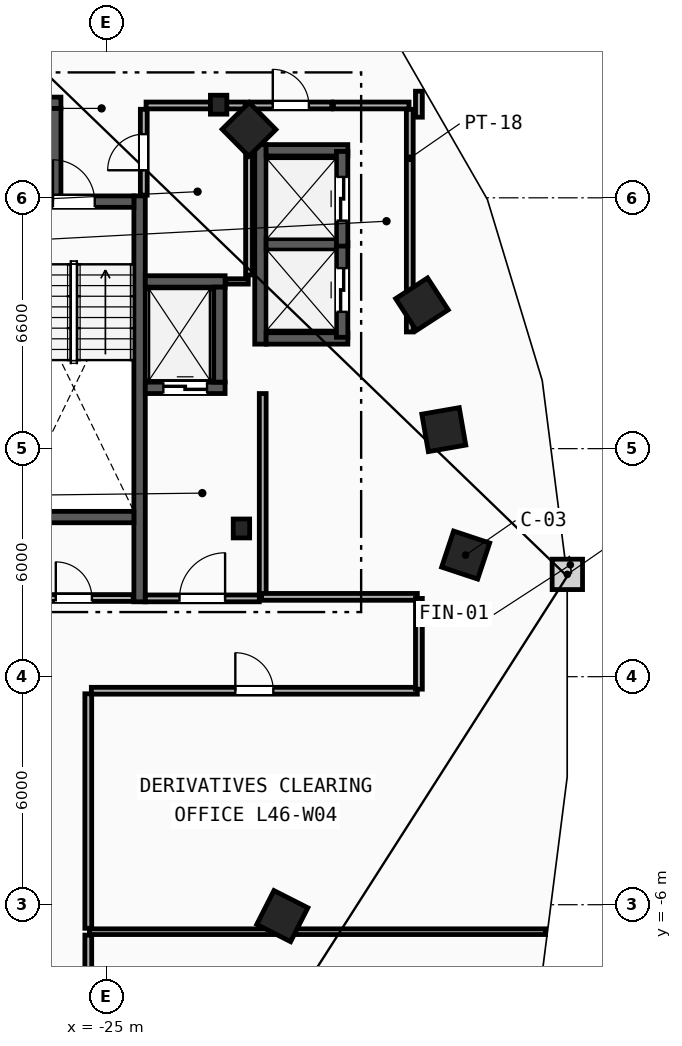
"""IFC4 building model, lengths in metres.
Left out: names, types, materials, properties, quantities, classifications, styles, units other than length and angle.
Written with IfcOpenShell. Run it as: python <this file> out.ifc"""

import sys

from ifc_helpers import new_model, si_unit, direction, frame, frame_2d, origin, origin_2d, place, context, subcontext, project, spatial, rectangle, i_section, extrude, element, fill, save


model = new_model("IFC4")
c1 = context("Model", 3, precision=1e-05, world=origin(), true_north=direction((0.0, 1.0)))
c2 = subcontext(c1, "Body", "Model", "MODEL_VIEW")
j1 = project(units=[si_unit("LENGTHUNIT", "METRE"), si_unit("PLANEANGLEUNIT", "RADIAN")], contexts=[c1])
p1 = place(None, origin())
s1 = spatial("IfcSite", under=j1, at=p1, CompositionType="ELEMENT")
p2 = place(p1, origin())
s2 = spatial("IfcBuilding", under=s1, at=p2, CompositionType="ELEMENT")
p3 = place(p2, frame((0.0, 0.0, 176.4)))
s3 = spatial("IfcBuildingStorey", under=s2, at=p3, CompositionType="ELEMENT", Elevation=176.4)
for number, where, z_axis, x_axis in (
    (1, (-21.45, 3.9, 0.0), (0.0, 0.0, 1.0), (1.0, 0.0, 0.0)),
    (2, (-22.05, 15.05, 0.0), (0.0, 0.0, 1.0), (1.0, 0.0, 0.0)),
):
    element("IfcColumn", number, at=place(p3, frame(where, z_axis=z_axis, x_axis=x_axis)), inside=s3, PredefinedType="COLUMN", context=c2, shape_type="SweptSolid", body=[
        extrude(i_section(OverallWidth=0.432, OverallDepth=0.498, WebThickness=0.056, FlangeThickness=0.089, FilletRadius=0.018, at=origin_2d()), origin(), (0.0, 0.0, 1.0), 3.6),
    ])
for number, where, z_axis, x_axis in (
    (3, (-15.55, 3.2, 0.0), (0.0, 0.0, 1.0), (0.315, 0.949, 0.0)),
    (4, (-16.125, 6.5, 0.0), (0.0, 0.0, 1.0), (-0.172, 0.985, 0.0)),
    (5, (-16.7, 9.8, 0.0), (0.0, 0.0, 1.0), (-0.544, 0.839, 0.0)),
    (6, (-21.25, 14.4, 0.0), (0.0, 0.0, 1.0), (-0.703, 0.711, 0.0)),
    (7, (-20.375, -6.3, 0.0), (0.0, 0.0, 1.0), (0.453, 0.892, 0.0)),
):
    element("IfcColumn", number, at=place(p3, frame(where, z_axis=z_axis, x_axis=x_axis)), inside=s3, PredefinedType="COLUMN", context=c2, shape_type="SweptSolid", body=[
        extrude(rectangle(XDim=1.0, YDim=1.0, at=origin_2d()), origin(), (0.0, 0.0, 1.0), 3.6),
    ])
p4 = place(p3, frame((-24.13, 1.97, 0.0), z_axis=(0.0, 0.0, 1.0), x_axis=(0.0, 1.0, 0.0)))
e8 = element("IfcWall", 8, at=p4, inside=s3, PredefinedType="SHEAR", context=c2, shape_type="SweptSolid", body=[
    extrude(rectangle(XDim=10.68, YDim=0.3, at=frame_2d((5.34, 0.0))), origin(), (0.0, 0.0, 1.0), 3.36),
])
p5 = place(p3, frame((-27.44, 12.5, 0.0), z_axis=(0.0, 0.0, 1.0), x_axis=(1.0, 0.0, 0.0)))
e9 = element("IfcWall", 9, at=p5, inside=s3, PredefinedType="SHEAR", context=c2, shape_type="SweptSolid", body=[
    extrude(rectangle(XDim=3.16, YDim=0.3, at=frame_2d((1.58, 0.0))), origin(), (0.0, 0.0, 1.0), 3.36),
])
p6 = place(p5, frame((1.03, 0.0, 0.0)))
e10 = element("IfcOpeningElement", 10, at=p6, cuts=e9, PredefinedType="OPENING", context=c2, shape_type="SweptSolid", body=[
    extrude(rectangle(XDim=1.1, YDim=2.15, at=frame_2d((0.55, 1.075))), frame((0.0, 0.16, 0.0), z_axis=(0.0, -1.0, 0.0), x_axis=(1.0, 0.0, 0.0)), (0.0, 0.0, 1.0), 0.32),
])
p7 = place(p3, frame((-27.44, 4.2, 0.0), z_axis=(0.0, 0.0, 1.0), x_axis=(1.0, 0.0, 0.0)))
e11 = element("IfcWall", 11, at=p7, inside=s3, PredefinedType="SHEAR", context=c2, shape_type="SweptSolid", body=[
    extrude(rectangle(XDim=3.16, YDim=0.3, at=frame_2d((1.58, 0.0))), origin(), (0.0, 0.0, 1.0), 3.36),
])
p8 = place(p3, frame((-20.89, 2.15, 0.0), z_axis=(0.0, 0.0, 1.0), x_axis=(0.0, 1.0, 0.0)))
e12 = element("IfcWall", 12, at=p8, inside=s3, PredefinedType="PARTITIONING", context=c2, shape_type="SweptSolid", body=[
    extrude(rectangle(XDim=5.3, YDim=0.18, at=frame_2d((2.65, 0.0))), origin(), (0.0, 0.0, 1.0), 3.36),
])
p9 = place(p3, frame((-23.98, 2.06, 0.0), z_axis=(0.0, 0.0, 1.0), x_axis=(1.0, 0.0, 0.0)))
e13 = element("IfcWall", 13, at=p9, inside=s3, PredefinedType="PARTITIONING", context=c2, shape_type="SweptSolid", body=[
    extrude(rectangle(XDim=3.0, YDim=0.18, at=frame_2d((1.5, 0.0))), origin(), (0.0, 0.0, 1.0), 3.36),
])
p10 = place(p9, frame((0.9, 0.0, 0.0)))
e14 = element("IfcOpeningElement", 14, at=p10, cuts=e13, PredefinedType="OPENING", context=c2, shape_type="SweptSolid", body=[
    extrude(rectangle(XDim=1.2, YDim=2.15, at=frame_2d((0.6, 1.075))), frame((0.0, 0.1, 0.0), z_axis=(0.0, -1.0, 0.0), x_axis=(1.0, 0.0, 0.0)), (0.0, 0.0, 1.0), 0.2),
])
p11 = place(p3, frame((-23.98, 7.6, 0.0), z_axis=(0.0, 0.0, 1.0), x_axis=(1.0, 0.0, 0.0)))
e15 = element("IfcWall", 15, at=p11, inside=s3, PredefinedType="SHEAR", context=c2, shape_type="SweptSolid", body=[
    extrude(rectangle(XDim=2.1, YDim=0.3, at=frame_2d((1.05, 0.0))), origin(), (0.0, 0.0, 1.0), 3.36),
])
p12 = place(p11, frame((0.475, 0.0, 0.0)))
e16 = element("IfcOpeningElement", 16, at=p12, cuts=e15, PredefinedType="OPENING", context=c2, shape_type="SweptSolid", body=[
    extrude(rectangle(XDim=1.15, YDim=2.2, at=frame_2d((0.575, 1.1))), frame((0.0, 0.16, 0.0), z_axis=(0.0, -1.0, 0.0), x_axis=(1.0, 0.0, 0.0)), (0.0, 0.0, 1.0), 0.32),
])
p13 = place(p3, frame((-23.98, 10.4, 0.0), z_axis=(0.0, 0.0, 1.0), x_axis=(1.0, 0.0, 0.0)))
e17 = element("IfcWall", 17, at=p13, inside=s3, PredefinedType="SHEAR", context=c2, shape_type="SweptSolid", body=[
    extrude(rectangle(XDim=2.1, YDim=0.3, at=frame_2d((1.05, 0.0))), origin(), (0.0, 0.0, 1.0), 3.36),
])
for number, where, z_axis, x_axis in (
    (18, (-22.03, 7.75, 0.0), (0.0, 0.0, 1.0), (0.0, 1.0, 0.0)),
    (19, (-28.7, 15.1, 0.0), (0.0, 0.0, 1.0), (1.0, 0.0, 0.0)),
):
    element("IfcWall", number, at=place(p3, frame(where, z_axis=z_axis, x_axis=x_axis)), inside=s3, PredefinedType="SHEAR", context=c2, shape_type="SweptSolid", body=[
        extrude(rectangle(XDim=2.5, YDim=0.3, at=frame_2d((1.25, 0.0))), origin(), (0.0, 0.0, 1.0), 3.36),
    ])
p14 = place(p3, frame((-26.35, 12.65, 0.0), z_axis=(0.0, 0.0, 1.0), x_axis=(0.0, 1.0, 0.0)))
e20 = element("IfcWall", 20, at=p14, inside=s3, PredefinedType="SHEAR", context=c2, shape_type="SweptSolid", body=[
    extrude(rectangle(XDim=2.3, YDim=0.3, at=frame_2d((1.15, 0.0))), origin(), (0.0, 0.0, 1.0), 3.36),
])
p15 = place(p3, frame((-20.95, 8.75, 0.0), z_axis=(0.0, 0.0, 1.0), x_axis=(0.0, 1.0, 0.0)))
e21 = element("IfcWall", 21, at=p15, inside=s3, PredefinedType="SHEAR", context=c2, shape_type="SweptSolid", body=[
    extrude(rectangle(XDim=5.25, YDim=0.3, at=frame_2d((2.625, 0.0))), origin(), (0.0, 0.0, 1.0), 3.36),
])
for number, where, z_axis, x_axis in (
    (22, (-20.8, 8.9, 0.0), (0.0, 0.0, 1.0), (1.0, 0.0, 0.0)),
    (23, (-20.8, 13.85, 0.0), (0.0, 0.0, 1.0), (1.0, 0.0, 0.0)),
):
    element("IfcWall", number, at=place(p3, frame(where, z_axis=z_axis, x_axis=x_axis)), inside=s3, PredefinedType="SHEAR", context=c2, shape_type="SweptSolid", body=[
        extrude(rectangle(XDim=2.15, YDim=0.3, at=frame_2d((1.075, 0.0))), origin(), (0.0, 0.0, 1.0), 3.36),
    ])
p16 = place(p3, frame((-20.8, 11.375, 0.0), z_axis=(0.0, 0.0, 1.0), x_axis=(1.0, 0.0, 0.0)))
e24 = element("IfcWall", 24, at=p16, inside=s3, PredefinedType="SHEAR", context=c2, shape_type="SweptSolid", body=[
    extrude(rectangle(XDim=1.85, YDim=0.3, at=frame_2d((0.925, 0.0))), origin(), (0.0, 0.0, 1.0), 3.36),
])
p17 = place(p3, frame((-18.8, 8.93, 0.0), z_axis=(0.0, 0.0, 1.0), x_axis=(0.0, 1.0, 0.0)))
e25 = element("IfcWall", 25, at=p17, inside=s3, PredefinedType="SHEAR", context=c2, shape_type="SweptSolid", body=[
    extrude(rectangle(XDim=2.49, YDim=0.3, at=frame_2d((1.245, 0.0))), origin(), (0.0, 0.0, 1.0), 3.36),
])
p18 = place(p17, frame((0.67, 0.0, 0.0)))
e26 = element("IfcOpeningElement", 26, at=p18, cuts=e25, PredefinedType="OPENING", context=c2, shape_type="SweptSolid", body=[
    extrude(rectangle(XDim=1.15, YDim=2.2, at=frame_2d((0.575, 1.1))), frame((0.0, 0.16, 0.0), z_axis=(0.0, -1.0, 0.0), x_axis=(1.0, 0.0, 0.0)), (0.0, 0.0, 1.0), 0.32),
])
p19 = place(p3, frame((-18.8, 11.33, 0.0), z_axis=(0.0, 0.0, 1.0), x_axis=(0.0, 1.0, 0.0)))
e27 = element("IfcWall", 27, at=p19, inside=s3, PredefinedType="SHEAR", context=c2, shape_type="SweptSolid", body=[
    extrude(rectangle(XDim=2.49, YDim=0.3, at=frame_2d((1.245, 0.0))), origin(), (0.0, 0.0, 1.0), 3.36),
])
p20 = place(p19, frame((0.67, 0.0, 0.0)))
e28 = element("IfcOpeningElement", 28, at=p20, cuts=e27, PredefinedType="OPENING", context=c2, shape_type="SweptSolid", body=[
    extrude(rectangle(XDim=1.15, YDim=2.2, at=frame_2d((0.575, 1.1))), frame((0.0, 0.16, 0.0), z_axis=(0.0, -1.0, 0.0), x_axis=(1.0, 0.0, 0.0)), (0.0, 0.0, 1.0), 0.32),
])
p21 = place(p3, frame((-17.02, 9.07, 0.0), z_axis=(0.0, 0.0, 1.0), x_axis=(0.0, 1.0, 0.0)))
e29 = element("IfcWall", 29, at=p21, inside=s3, PredefinedType="PARTITIONING", context=c2, shape_type="SweptSolid", body=[
    extrude(rectangle(XDim=5.86, YDim=0.18, at=frame_2d((2.93, 0.0))), origin(), (0.0, 0.0, 1.0), 3.36),
])
p22 = place(p3, frame((-21.23, 15.03, 0.0), z_axis=(0.0, 0.0, 1.0), x_axis=(1.0, 0.0, 0.0)))
e30 = element("IfcWall", 30, at=p22, inside=s3, PredefinedType="PARTITIONING", context=c2, shape_type="SweptSolid", body=[
    extrude(rectangle(XDim=2.16, YDim=0.18, at=frame_2d((1.08, 0.0))), origin(), (0.0, 0.0, 1.0), 3.36),
])
p23 = place(p22, frame((0.605, 0.0, 0.0)))
e31 = element("IfcOpeningElement", 31, at=p23, cuts=e30, PredefinedType="OPENING", context=c2, shape_type="SweptSolid", body=[
    extrude(rectangle(XDim=0.95, YDim=2.1, at=frame_2d((0.475, 1.05))), frame((0.0, 0.1, 0.0), z_axis=(0.0, -1.0, 0.0), x_axis=(1.0, 0.0, 0.0)), (0.0, 0.0, 1.0), 0.2),
])
p24 = place(p3, frame((-19.03, 15.03, 0.0), z_axis=(0.0, 0.0, 1.0), x_axis=(1.0, 0.0, 0.0)))
e32 = element("IfcWall", 32, at=p24, inside=s3, PredefinedType="PARTITIONING", context=c2, shape_type="SweptSolid", body=[
    extrude(rectangle(XDim=1.99, YDim=0.18, at=frame_2d((0.995, 0.0))), origin(), (0.0, 0.0, 1.0), 3.36),
])
p25 = place(p3, frame((-21.86, 10.4, 0.0), z_axis=(0.0, 0.0, 1.0), x_axis=(1.0, 0.0, 0.0)))
e33 = element("IfcWall", 33, at=p25, inside=s3, PredefinedType="PARTITIONING", context=c2, shape_type="SweptSolid", body=[
    extrude(rectangle(XDim=0.59, YDim=0.14, at=frame_2d((0.295, 0.0))), origin(), (0.0, 0.0, 1.0), 3.36),
])
p26 = place(p3, frame((-21.25, 10.57, 0.0), z_axis=(0.0, 0.0, 1.0), x_axis=(0.0, 1.0, 0.0)))
e34 = element("IfcWall", 34, at=p26, inside=s3, PredefinedType="PARTITIONING", context=c2, shape_type="SweptSolid", body=[
    extrude(rectangle(XDim=4.36, YDim=0.18, at=frame_2d((2.18, 0.0))), origin(), (0.0, 0.0, 1.0), 3.36),
])
p27 = place(p3, frame((-23.96, 15.03, 0.0), z_axis=(0.0, 0.0, 1.0), x_axis=(1.0, 0.0, 0.0)))
e35 = element("IfcWall", 35, at=p27, inside=s3, PredefinedType="PARTITIONING", context=c2, shape_type="SweptSolid", body=[
    extrude(rectangle(XDim=2.61, YDim=0.18, at=frame_2d((1.305, 0.0))), origin(), (0.0, 0.0, 1.0), 2.433),
])
p28 = place(p3, frame((-27.42, 2.07, 0.0), z_axis=(0.0, 0.0, 1.0), x_axis=(1.0, 0.0, 0.0)))
e36 = element("IfcWall", 36, at=p28, inside=s3, PredefinedType="PARTITIONING", context=c2, shape_type="SweptSolid", body=[
    extrude(rectangle(XDim=3.12, YDim=0.18, at=frame_2d((1.56, 0.0))), origin(), (0.0, 0.0, 1.0), 3.36),
])
p29 = place(p28, frame((1.085, 0.0, 0.0)))
e37 = element("IfcOpeningElement", 37, at=p29, cuts=e36, PredefinedType="OPENING", context=c2, shape_type="SweptSolid", body=[
    extrude(rectangle(XDim=0.95, YDim=2.1, at=frame_2d((0.475, 1.05))), frame((0.0, 0.1, 0.0), z_axis=(0.0, -1.0, 0.0), x_axis=(1.0, 0.0, 0.0)), (0.0, 0.0, 1.0), 0.2),
])
p30 = place(p3, frame((-24.02, 12.67, 0.0), z_axis=(0.0, 0.0, 1.0), x_axis=(0.0, 1.0, 0.0)))
e38 = element("IfcWall", 38, at=p30, inside=s3, PredefinedType="PARTITIONING", context=c2, shape_type="SweptSolid", body=[
    extrude(rectangle(XDim=2.26, YDim=0.18, at=frame_2d((1.13, 0.0))), origin(), (0.0, 0.0, 1.0), 3.36),
])
p31 = place(p30, frame((0.655, 0.0, 0.0)))
e39 = element("IfcOpeningElement", 39, at=p31, cuts=e38, PredefinedType="OPENING", context=c2, shape_type="SweptSolid", body=[
    extrude(rectangle(XDim=0.95, YDim=2.1, at=frame_2d((0.475, 1.05))), frame((0.0, 0.1, 0.0), z_axis=(0.0, -1.0, 0.0), x_axis=(1.0, 0.0, 0.0)), (0.0, 0.0, 1.0), 0.2),
])
p32 = place(p3, frame((-25.45, -6.71, 0.0), z_axis=(0.0, 0.0, 1.0), x_axis=(1.0, 0.0, 0.0)))
e40 = element("IfcWall", 40, at=p32, inside=s3, PredefinedType="PARTITIONING", context=c2, shape_type="SweptSolid", body=[
    extrude(rectangle(XDim=12.003, YDim=0.15, at=frame_2d((6.001, 0.0))), origin(), (0.0, 0.0, 1.0), 3.36),
])
p33 = place(p3, frame((-25.48, -11.178, 0.0), z_axis=(0.0, 0.0, 1.0), x_axis=(0.0, 1.0, 0.0)))
e41 = element("IfcWall", 41, at=p33, inside=s3, PredefinedType="PARTITIONING", context=c2, shape_type="SweptSolid", body=[
    extrude(rectangle(XDim=4.378, YDim=0.18, at=frame_2d((2.189, 0.0))), origin(), (0.0, 0.0, 1.0), 3.36),
])
p34 = place(p3, frame((-25.4, -0.37, 0.0), z_axis=(0.0, 0.0, 1.0), x_axis=(1.0, 0.0, 0.0)))
e42 = element("IfcWall", 42, at=p34, inside=s3, PredefinedType="PARTITIONING", context=c2, shape_type="SweptSolid", body=[
    extrude(rectangle(XDim=8.578, YDim=0.18, at=frame_2d((4.289, 0.0))), origin(), (0.0, 0.0, 1.0), 3.36),
])
p35 = place(p34, frame((3.789, 0.0, 0.0)))
e43 = element("IfcOpeningElement", 43, at=p35, cuts=e42, PredefinedType="OPENING", context=c2, shape_type="SweptSolid", body=[
    extrude(rectangle(XDim=1.0, YDim=2.15, at=frame_2d((0.5, 1.075))), frame((0.0, 0.1, 0.0), z_axis=(0.0, -1.0, 0.0), x_axis=(1.0, 0.0, 0.0)), (0.0, 0.0, 1.0), 0.2),
])
p36 = place(p3, frame((-25.48, -6.62, 0.0), z_axis=(0.0, 0.0, 1.0), x_axis=(0.0, 1.0, 0.0)))
e44 = element("IfcWall", 44, at=p36, inside=s3, PredefinedType="PARTITIONING", context=c2, shape_type="SweptSolid", body=[
    extrude(rectangle(XDim=6.17, YDim=0.18, at=frame_2d((3.085, 0.0))), origin(), (0.0, 0.0, 1.0), 3.36),
])
p37 = place(p3, frame((-16.822, 2.1, 0.0), z_axis=(0.0, 0.0, 1.0), x_axis=(-1.0, 0.0, 0.0)))
e45 = element("IfcWall", 45, at=p37, inside=s3, PredefinedType="PARTITIONING", context=c2, shape_type="SweptSolid", body=[
    extrude(rectangle(XDim=4.098, YDim=0.18, at=frame_2d((2.049, 0.0))), origin(), (0.0, 0.0, 1.0), 3.36),
])
p38 = place(p3, frame((-16.78, -0.329, 0.0), z_axis=(0.0, 0.0, 1.0), x_axis=(0.0, 1.0, 0.0)))
e46 = element("IfcWall", 46, at=p38, inside=s3, PredefinedType="PARTITIONING", context=c2, shape_type="SweptSolid", body=[
    extrude(rectangle(XDim=2.387, YDim=0.18, at=frame_2d((1.194, 0.0))), origin(), (0.0, 0.0, 1.0), 3.36),
])
p39 = place(p3, frame((-16.78, 14.721, 0.0), z_axis=(0.0, 0.0, 1.0), x_axis=(0.0, 1.0, 0.0)))
e47 = element("IfcWall", 47, at=p39, inside=s3, PredefinedType="PARTITIONING", context=c2, shape_type="SweptSolid", body=[
    extrude(rectangle(XDim=0.684, YDim=0.18, at=frame_2d((0.342, 0.0))), origin(), (0.0, 0.0, 1.0), 3.36),
])
p40 = place(p6, origin())
e48 = element("IfcDoor", 48, at=p40, inside=s3, OperationType="SINGLE_SWING_LEFT", PredefinedType="DOOR", context=c2, shape_type="SweptSolid", body=[
    extrude(rectangle(XDim=1.1, YDim=2.15, at=frame_2d((0.55, 1.075))), frame((0.0, 0.025, 0.0), z_axis=(0.0, -1.0, 0.0), x_axis=(1.0, 0.0, 0.0)), (0.0, 0.0, 1.0), 0.05),
])
fill(e10, e48)
p41 = place(p10, origin())
e49 = element("IfcDoor", 49, at=p41, inside=s3, OperationType="SINGLE_SWING_RIGHT", PredefinedType="DOOR", context=c2, shape_type="SweptSolid", body=[
    extrude(rectangle(XDim=1.2, YDim=2.15, at=frame_2d((0.6, 1.075))), frame((0.0, 0.025, 0.0), z_axis=(0.0, -1.0, 0.0), x_axis=(1.0, 0.0, 0.0)), (0.0, 0.0, 1.0), 0.05),
])
fill(e14, e49)
p42 = place(p12, origin())
e50 = element("IfcDoor", 50, at=p42, inside=s3, OperationType="SLIDING_TO_LEFT", PredefinedType="TRAPDOOR", context=c2, shape_type="SweptSolid", body=[
    extrude(rectangle(XDim=1.15, YDim=2.2, at=frame_2d((0.575, 1.1))), frame((0.0, 0.025, 0.0), z_axis=(0.0, -1.0, 0.0), x_axis=(1.0, 0.0, 0.0)), (0.0, 0.0, 1.0), 0.05),
])
fill(e16, e50)
p43 = place(p18, origin())
e51 = element("IfcDoor", 51, at=p43, inside=s3, OperationType="SLIDING_TO_LEFT", PredefinedType="TRAPDOOR", context=c2, shape_type="SweptSolid", body=[
    extrude(rectangle(XDim=1.15, YDim=2.2, at=frame_2d((0.575, 1.1))), frame((0.0, 0.025, 0.0), z_axis=(0.0, -1.0, 0.0), x_axis=(1.0, 0.0, 0.0)), (0.0, 0.0, 1.0), 0.05),
])
fill(e26, e51)
p44 = place(p20, origin())
e52 = element("IfcDoor", 52, at=p44, inside=s3, OperationType="SLIDING_TO_LEFT", PredefinedType="TRAPDOOR", context=c2, shape_type="SweptSolid", body=[
    extrude(rectangle(XDim=1.15, YDim=2.2, at=frame_2d((0.575, 1.1))), frame((0.0, 0.025, 0.0), z_axis=(0.0, -1.0, 0.0), x_axis=(1.0, 0.0, 0.0)), (0.0, 0.0, 1.0), 0.05),
])
fill(e28, e52)
p45 = place(p35, origin())
e53 = element("IfcDoor", 53, at=p45, inside=s3, OperationType="SINGLE_SWING_LEFT", PredefinedType="DOOR", context=c2, shape_type="SweptSolid", body=[
    extrude(rectangle(XDim=1.0, YDim=2.15, at=frame_2d((0.5, 1.075))), frame((0.0, 0.025, 0.0), z_axis=(0.0, -1.0, 0.0), x_axis=(1.0, 0.0, 0.0)), (0.0, 0.0, 1.0), 0.05),
])
fill(e43, e53)
p46 = place(p29, origin())
e54 = element("IfcDoor", 54, at=p46, inside=s3, OperationType="SINGLE_SWING_LEFT", PredefinedType="DOOR", context=c2, shape_type="SweptSolid", body=[
    extrude(rectangle(XDim=0.95, YDim=2.1, at=frame_2d((0.475, 1.05))), frame((0.0, 0.025, 0.0), z_axis=(0.0, -1.0, 0.0), x_axis=(1.0, 0.0, 0.0)), (0.0, 0.0, 1.0), 0.05),
])
fill(e37, e54)
p47 = place(p31, origin())
e55 = element("IfcDoor", 55, at=p47, inside=s3, OperationType="SINGLE_SWING_LEFT", PredefinedType="DOOR", context=c2, shape_type="SweptSolid", body=[
    extrude(rectangle(XDim=0.95, YDim=2.1, at=frame_2d((0.475, 1.05))), frame((0.0, 0.025, 0.0), z_axis=(0.0, -1.0, 0.0), x_axis=(1.0, 0.0, 0.0)), (0.0, 0.0, 1.0), 0.05),
])
fill(e39, e55)
p48 = place(p23, origin())
e56 = element("IfcDoor", 56, at=p48, inside=s3, OperationType="SINGLE_SWING_LEFT", PredefinedType="DOOR", context=c2, shape_type="SweptSolid", body=[
    extrude(rectangle(XDim=0.95, YDim=2.1, at=frame_2d((0.475, 1.05))), frame((0.0, 0.025, 0.0), z_axis=(0.0, -1.0, 0.0), x_axis=(1.0, 0.0, 0.0)), (0.0, 0.0, 1.0), 0.05),
])
fill(e31, e56)
save(model, sys.argv[1])
